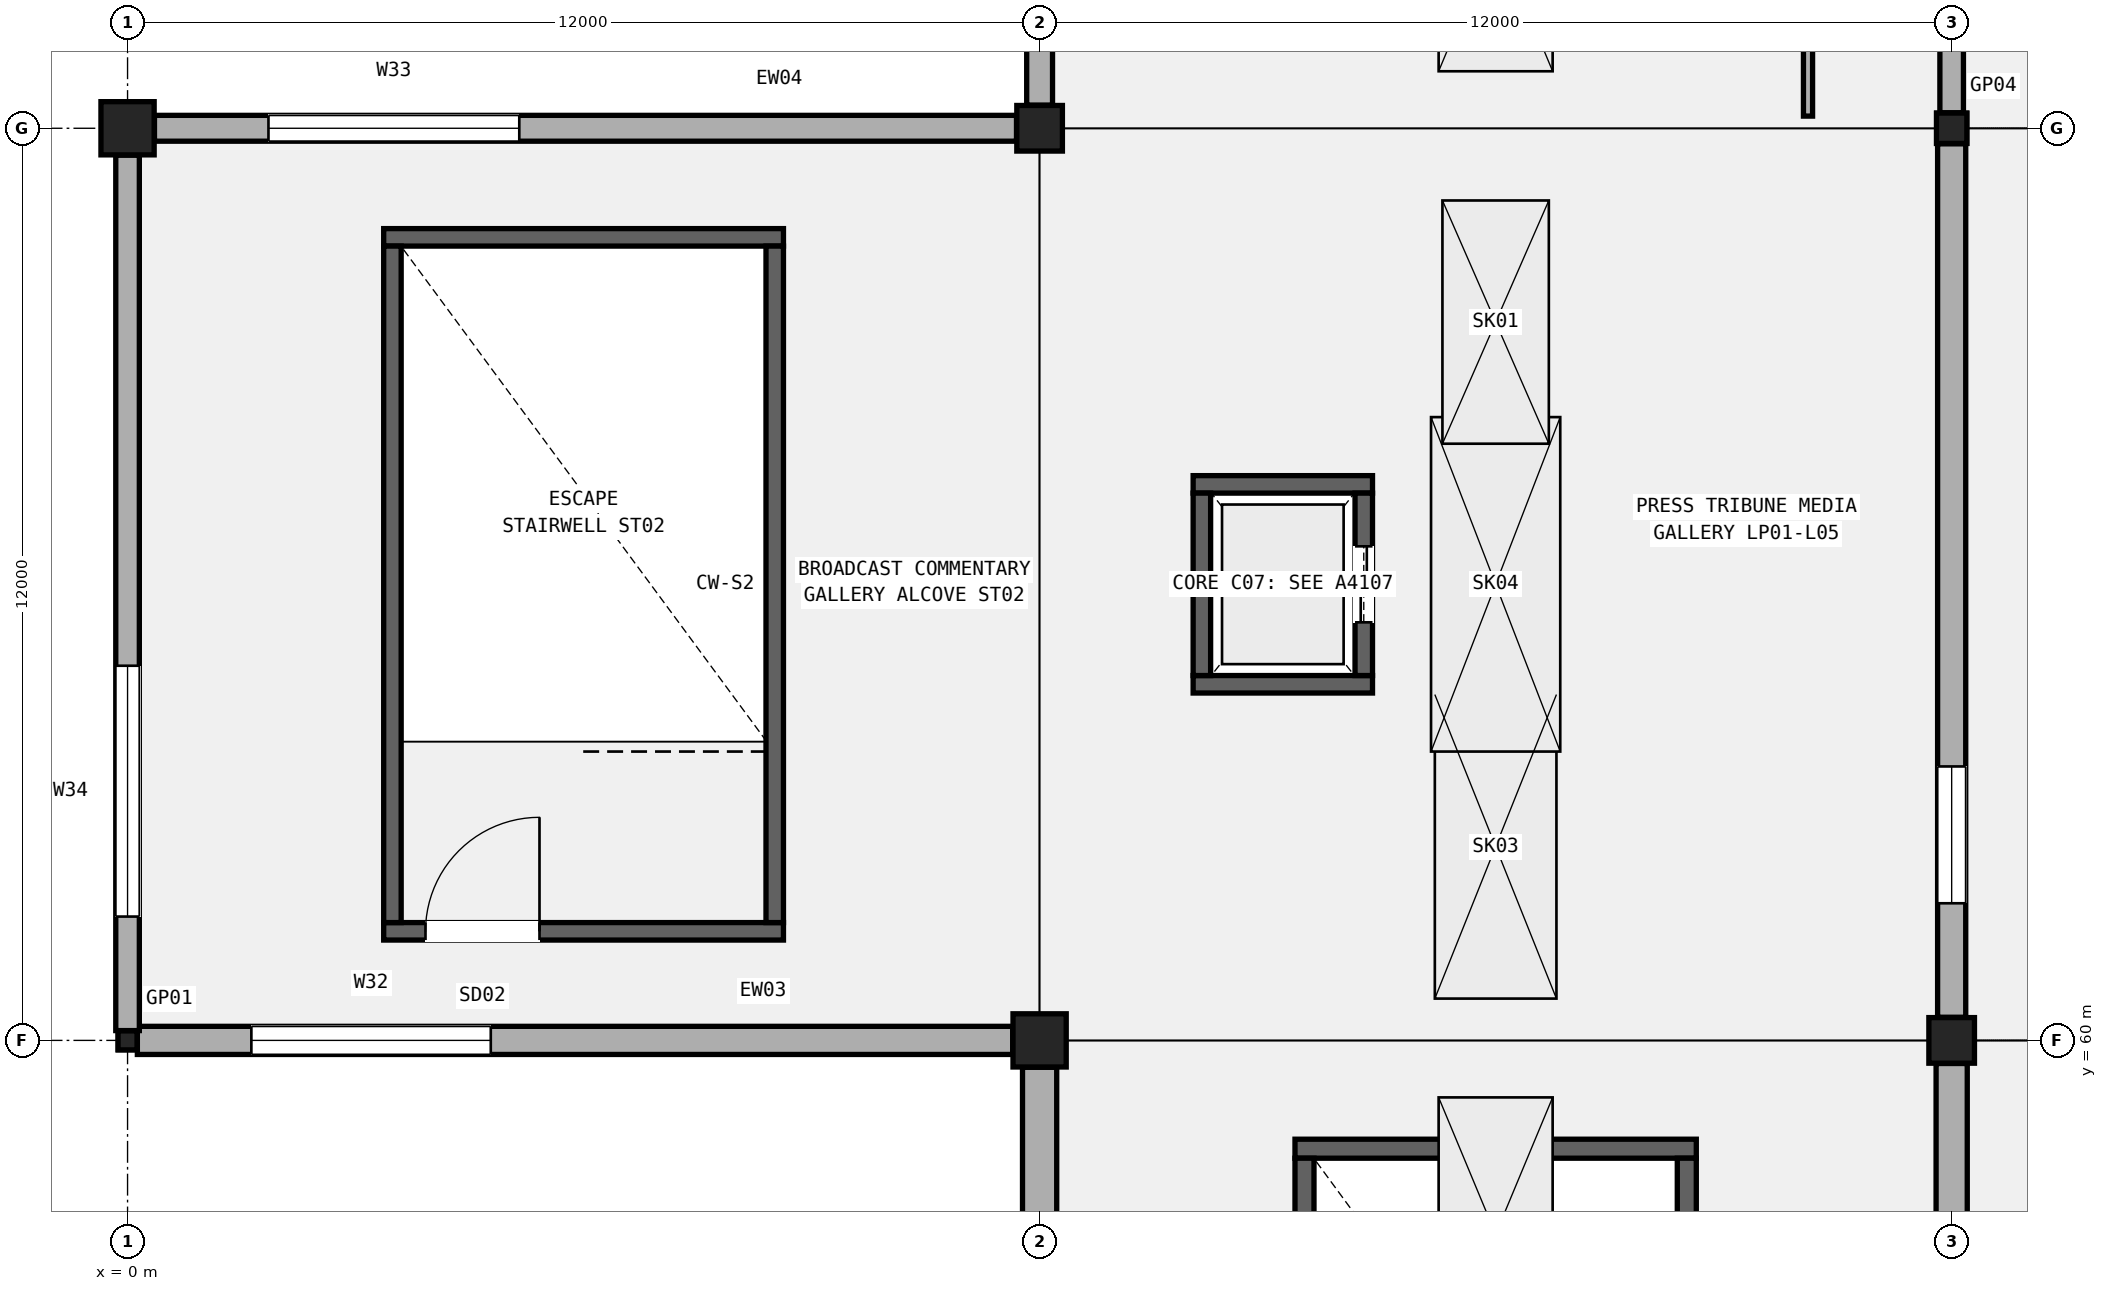
"""IFC4 building model, lengths in metres.
Left out: names, types, materials, properties, quantities, classifications, styles, units other than length and angle.
Written with IfcOpenShell. Run it as: python <this file> out.ifc"""

import sys

from ifc_helpers import new_model, si_unit, direction, frame, frame_2d, origin, origin_2d, place, context, subcontext, project, spatial, rectangle, hollow_rectangle, extrude, element, fill, save


model = new_model("IFC4")
c1 = context("Model", 3, precision=1e-05, world=origin(), true_north=direction((0.0, 1.0)))
c2 = subcontext(c1, "Body", "Model", "MODEL_VIEW")
j1 = project(units=[si_unit("LENGTHUNIT", "METRE"), si_unit("PLANEANGLEUNIT", "RADIAN")], contexts=[c1])
p1 = place(None, origin())
s1 = spatial("IfcSite", under=j1, at=p1, CompositionType="ELEMENT")
p2 = place(p1, origin())
s2 = spatial("IfcBuilding", under=s1, at=p2, CompositionType="ELEMENT")
p3 = place(p2, frame((0.0, 0.0, 25.8)))
s3 = spatial("IfcBuildingStorey", under=s2, at=p3, CompositionType="ELEMENT", Elevation=25.8)
p4 = place(p3, frame((0.0, 60.0, 0.0), z_axis=(0.0, 0.0, 1.0), x_axis=(1.0, 0.0, 0.0)))
e1 = element("IfcColumn", 1, at=p4, inside=s3, PredefinedType="COLUMN", context=c2, shape_type="SweptSolid", body=[
    extrude(hollow_rectangle(XDim=0.25, YDim=0.25, WallThickness=0.012, InnerFilletRadius=0.012, OuterFilletRadius=0.024, at=origin_2d()), origin(), (0.0, 0.0, 1.0), 5.4),
])
for number, where, z_axis, x_axis in (
    (2, (0.0, 72.0, 0.0), (0.0, 0.0, 1.0), (1.0, 0.0, 0.0)),
    (3, (12.0, 60.0, 0.0), (0.0, 0.0, 1.0), (1.0, 0.0, 0.0)),
):
    element("IfcColumn", number, at=place(p3, frame(where, z_axis=z_axis, x_axis=x_axis)), inside=s3, PredefinedType="COLUMN", context=c2, shape_type="SweptSolid", body=[
        extrude(rectangle(XDim=0.7, YDim=0.7, at=origin_2d()), origin(), (0.0, 0.0, 1.0), 5.4),
    ])
for number, where, z_axis, x_axis in (
    (4, (12.0, 72.0, 0.0), (0.0, 0.0, 1.0), (1.0, 0.0, 0.0)),
    (5, (24.0, 60.0, 0.0), (0.0, 0.0, 1.0), (1.0, 0.0, 0.0)),
):
    element("IfcColumn", number, at=place(p3, frame(where, z_axis=z_axis, x_axis=x_axis)), inside=s3, PredefinedType="COLUMN", context=c2, shape_type="SweptSolid", body=[
        extrude(rectangle(XDim=0.6, YDim=0.6, at=origin_2d()), origin(), (0.0, 0.0, 1.0), 5.4),
    ])
p5 = place(p3, frame((24.0, 72.0, 0.0), z_axis=(0.0, 0.0, 1.0), x_axis=(1.0, 0.0, 0.0)))
e6 = element("IfcColumn", 6, at=p5, inside=s3, PredefinedType="COLUMN", context=c2, shape_type="SweptSolid", body=[
    extrude(hollow_rectangle(XDim=0.4, YDim=0.4, WallThickness=0.016, InnerFilletRadius=0.016, OuterFilletRadius=0.032, at=origin_2d()), origin(), (0.0, 0.0, 1.0), 5.4),
])
p6 = place(p3, frame((0.129, 60.0, 0.0), z_axis=(0.0, 0.0, 1.0), x_axis=(1.0, 0.0, 0.0)))
e7 = element("IfcWall", 7, at=p6, inside=s3, PredefinedType="SOLIDWALL", context=c2, shape_type="SweptSolid", body=[
    extrude(rectangle(XDim=11.517, YDim=0.37, at=frame_2d((5.759, 0.0))), origin(), (0.0, 0.0, 1.0), 4.452),
])
p7 = place(p6, frame((1.5, 0.0, 0.95)))
e8 = element("IfcOpeningElement", 8, at=p7, cuts=e7, PredefinedType="OPENING", context=c2, shape_type="SweptSolid", body=[
    extrude(rectangle(XDim=3.15, YDim=1.9, at=frame_2d((1.575, 0.95))), frame((0.0, 0.195, 0.0), z_axis=(0.0, -1.0, 0.0), x_axis=(1.0, 0.0, 0.0)), (0.0, 0.0, 1.0), 0.39),
])
p8 = place(p3, frame((0.354, 72.0, 0.0), z_axis=(0.0, 0.0, 1.0), x_axis=(1.0, 0.0, 0.0)))
e9 = element("IfcWall", 9, at=p8, inside=s3, PredefinedType="SOLIDWALL", context=c2, shape_type="SweptSolid", body=[
    extrude(rectangle(XDim=11.342, YDim=0.34, at=frame_2d((5.671, 0.0))), origin(), (0.0, 0.0, 1.0), 4.34),
])
p9 = place(p8, frame((1.5, 0.0, 0.95)))
e10 = element("IfcOpeningElement", 10, at=p9, cuts=e9, PredefinedType="OPENING", context=c2, shape_type="SweptSolid", body=[
    extrude(rectangle(XDim=3.3, YDim=1.8, at=frame_2d((1.65, 0.9))), frame((0.0, 0.18, 0.0), z_axis=(0.0, -1.0, 0.0), x_axis=(1.0, 0.0, 0.0)), (0.0, 0.0, 1.0), 0.36),
])
p10 = place(p3, frame((0.0, 60.129, 0.0), z_axis=(0.0, 0.0, 1.0), x_axis=(0.0, 1.0, 0.0)))
e11 = element("IfcWall", 11, at=p10, inside=s3, PredefinedType="SOLIDWALL", context=c2, shape_type="SweptSolid", body=[
    extrude(rectangle(XDim=11.517, YDim=0.31, at=frame_2d((5.759, 0.0))), origin(), (0.0, 0.0, 1.0), 4.452),
])
p11 = place(p10, frame((1.5, 0.0, 0.95)))
e12 = element("IfcOpeningElement", 12, at=p11, cuts=e11, PredefinedType="OPENING", context=c2, shape_type="SweptSolid", body=[
    extrude(rectangle(XDim=3.3, YDim=2.25, at=frame_2d((1.65, 1.125))), frame((0.0, 0.165, 0.0), z_axis=(0.0, -1.0, 0.0), x_axis=(1.0, 0.0, 0.0)), (0.0, 0.0, 1.0), 0.33),
])
p12 = place(p3, frame((12.0, 48.129, 0.0), z_axis=(0.0, 0.0, 1.0), x_axis=(0.0, 1.0, 0.0)))
e13 = element("IfcWall", 13, at=p12, inside=s3, PredefinedType="SOLIDWALL", context=c2, shape_type="SweptSolid", body=[
    extrude(rectangle(XDim=11.517, YDim=0.45, at=frame_2d((5.759, 0.0))), origin(), (0.0, 0.0, 1.0), 4.452),
])
p13 = place(p12, frame((1.5, 0.0, 0.95)))
e14 = element("IfcOpeningElement", 14, at=p13, cuts=e13, PredefinedType="OPENING", context=c2, shape_type="SweptSolid", body=[
    extrude(rectangle(XDim=1.65, YDim=2.45, at=frame_2d((0.825, 1.225))), frame((0.0, 0.235, 0.0), z_axis=(0.0, -1.0, 0.0), x_axis=(1.0, 0.0, 0.0)), (0.0, 0.0, 1.0), 0.47),
])
p14 = place(p3, frame((24.0, 48.354, 0.0), z_axis=(0.0, 0.0, 1.0), x_axis=(0.0, 1.0, 0.0)))
e15 = element("IfcWall", 15, at=p14, inside=s3, PredefinedType="SOLIDWALL", context=c2, shape_type="SweptSolid", body=[
    extrude(rectangle(XDim=11.342, YDim=0.41, at=frame_2d((5.671, 0.0))), origin(), (0.0, 0.0, 1.0), 4.13),
])
p15 = place(p14, frame((1.5, 0.0, 0.95)))
e16 = element("IfcOpeningElement", 16, at=p15, cuts=e15, PredefinedType="OPENING", context=c2, shape_type="SweptSolid", body=[
    extrude(rectangle(XDim=1.8, YDim=1.75, at=frame_2d((0.9, 0.875))), frame((0.0, 0.215, 0.0), z_axis=(0.0, -1.0, 0.0), x_axis=(1.0, 0.0, 0.0)), (0.0, 0.0, 1.0), 0.43),
])
p16 = place(p3, frame((24.0, 60.304, 0.0), z_axis=(0.0, 0.0, 1.0), x_axis=(0.0, 1.0, 0.0)))
e17 = element("IfcWall", 17, at=p16, inside=s3, PredefinedType="SOLIDWALL", context=c2, shape_type="SweptSolid", body=[
    extrude(rectangle(XDim=11.492, YDim=0.37, at=frame_2d((5.746, 0.0))), origin(), (0.0, 0.0, 1.0), 4.13),
])
p17 = place(p16, frame((1.5, 0.0, 0.95)))
e18 = element("IfcOpeningElement", 18, at=p17, cuts=e17, PredefinedType="OPENING", context=c2, shape_type="SweptSolid", body=[
    extrude(rectangle(XDim=1.8, YDim=2.15, at=frame_2d((0.9, 1.075))), frame((0.0, 0.195, 0.0), z_axis=(0.0, -1.0, 0.0), x_axis=(1.0, 0.0, 0.0)), (0.0, 0.0, 1.0), 0.39),
])
p18 = place(p3, frame((12.0, 72.304, 0.0), z_axis=(0.0, 0.0, 1.0), x_axis=(0.0, 1.0, 0.0)))
e19 = element("IfcWall", 19, at=p18, inside=s3, PredefinedType="SOLIDWALL", context=c2, shape_type="SweptSolid", body=[
    extrude(rectangle(XDim=11.492, YDim=0.34, at=frame_2d((5.746, 0.0))), origin(), (0.0, 0.0, 1.0), 4.44),
])
p19 = place(p18, frame((5.859, 0.0, 0.95)))
e20 = element("IfcOpeningElement", 20, at=p19, cuts=e19, PredefinedType="OPENING", context=c2, shape_type="SweptSolid", body=[
    extrude(rectangle(XDim=1.8, YDim=2.55, at=frame_2d((0.9, 1.275))), frame((0.0, 0.18, 0.0), z_axis=(0.0, -1.0, 0.0), x_axis=(1.0, 0.0, 0.0)), (0.0, 0.0, 1.0), 0.36),
])
p20 = place(p3, frame((24.0, 72.204, 0.0), z_axis=(0.0, 0.0, 1.0), x_axis=(0.0, 1.0, 0.0)))
e21 = element("IfcWall", 21, at=p20, inside=s3, PredefinedType="SOLIDWALL", context=c2, shape_type="SweptSolid", body=[
    extrude(rectangle(XDim=11.617, YDim=0.31, at=frame_2d((5.809, 0.0))), origin(), (0.0, 0.0, 1.0), 4.13),
])
p21 = place(p20, frame((1.5, 0.0, 0.95)))
e22 = element("IfcOpeningElement", 22, at=p21, cuts=e21, PredefinedType="OPENING", context=c2, shape_type="SweptSolid", body=[
    extrude(rectangle(XDim=1.95, YDim=1.9, at=frame_2d((0.975, 0.95))), frame((0.0, 0.165, 0.0), z_axis=(0.0, -1.0, 0.0), x_axis=(1.0, 0.0, 0.0)), (0.0, 0.0, 1.0), 0.33),
])
p22 = place(p3, frame((3.37, 61.435, 0.0), z_axis=(0.0, 0.0, 1.0), x_axis=(1.0, 0.0, 0.0)))
e23 = element("IfcWall", 23, at=p22, inside=s3, PredefinedType="SHEAR", context=c2, shape_type="SweptSolid", body=[
    extrude(rectangle(XDim=5.26, YDim=0.23, at=frame_2d((2.63, 0.0))), origin(), (0.0, 0.0, 1.0), 5.04),
])
p23 = place(p22, frame((0.55, 0.0, 0.0)))
e24 = element("IfcOpeningElement", 24, at=p23, cuts=e23, PredefinedType="OPENING", context=c2, shape_type="SweptSolid", body=[
    extrude(rectangle(XDim=1.5, YDim=2.2, at=frame_2d((0.75, 1.1))), frame((0.0, 0.125, 0.0), z_axis=(0.0, -1.0, 0.0), x_axis=(1.0, 0.0, 0.0)), (0.0, 0.0, 1.0), 0.25),
])
p24 = place(p3, frame((3.37, 70.565, 0.0), z_axis=(0.0, 0.0, 1.0), x_axis=(1.0, 0.0, 0.0)))
e25 = element("IfcWall", 25, at=p24, inside=s3, PredefinedType="SHEAR", context=c2, shape_type="SweptSolid", body=[
    extrude(rectangle(XDim=5.26, YDim=0.23, at=frame_2d((2.63, 0.0))), origin(), (0.0, 0.0, 1.0), 5.04),
])
for number, where, z_axis, x_axis in (
    (26, (3.485, 61.55, 0.0), (0.0, 0.0, 1.0), (0.0, 1.0, 0.0)),
    (27, (8.515, 61.55, 0.0), (0.0, 0.0, 1.0), (0.0, 1.0, 0.0)),
):
    element("IfcWall", number, at=place(p3, frame(where, z_axis=z_axis, x_axis=x_axis)), inside=s3, PredefinedType="SHEAR", context=c2, shape_type="SweptSolid", body=[
        extrude(rectangle(XDim=8.9, YDim=0.23, at=frame_2d((4.45, 0.0))), origin(), (0.0, 0.0, 1.0), 5.04),
    ])
p25 = place(p3, frame((15.36, 58.575, 0.0), z_axis=(0.0, 0.0, 1.0), x_axis=(1.0, 0.0, 0.0)))
e28 = element("IfcWall", 28, at=p25, inside=s3, PredefinedType="SHEAR", context=c2, shape_type="SweptSolid", body=[
    extrude(rectangle(XDim=5.28, YDim=0.25, at=frame_2d((2.64, 0.0))), origin(), (0.0, 0.0, 1.0), 5.04),
])
for number, where, z_axis, x_axis in (
    (29, (15.485, 49.55, 0.0), (0.0, 0.0, 1.0), (0.0, 1.0, 0.0)),
    (30, (20.515, 49.55, 0.0), (0.0, 0.0, 1.0), (0.0, 1.0, 0.0)),
):
    element("IfcWall", number, at=place(p3, frame(where, z_axis=z_axis, x_axis=x_axis)), inside=s3, PredefinedType="SHEAR", context=c2, shape_type="SweptSolid", body=[
        extrude(rectangle(XDim=8.9, YDim=0.25, at=frame_2d((4.45, 0.0))), origin(), (0.0, 0.0, 1.0), 5.04),
    ])
for number, where, z_axis, x_axis in (
    (31, (14.02, 64.685, 0.0), (0.0, 0.0, 1.0), (1.0, 0.0, 0.0)),
    (32, (14.02, 67.315, 0.0), (0.0, 0.0, 1.0), (1.0, 0.0, 0.0)),
):
    element("IfcWall", number, at=place(p3, frame(where, z_axis=z_axis, x_axis=x_axis)), inside=s3, PredefinedType="SHEAR", context=c2, shape_type="SweptSolid", body=[
        extrude(rectangle(XDim=2.36, YDim=0.23, at=frame_2d((1.18, 0.0))), origin(), (0.0, 0.0, 1.0), 5.04),
    ])
p26 = place(p3, frame((14.135, 64.8, 0.0), z_axis=(0.0, 0.0, 1.0), x_axis=(0.0, 1.0, 0.0)))
e33 = element("IfcWall", 33, at=p26, inside=s3, PredefinedType="SHEAR", context=c2, shape_type="SweptSolid", body=[
    extrude(rectangle(XDim=2.4, YDim=0.23, at=frame_2d((1.2, 0.0))), origin(), (0.0, 0.0, 1.0), 5.04),
])
p27 = place(p3, frame((16.265, 64.8, 0.0), z_axis=(0.0, 0.0, 1.0), x_axis=(0.0, 1.0, 0.0)))
e34 = element("IfcWall", 34, at=p27, inside=s3, PredefinedType="SHEAR", context=c2, shape_type="SweptSolid", body=[
    extrude(rectangle(XDim=2.4, YDim=0.23, at=frame_2d((1.2, 0.0))), origin(), (0.0, 0.0, 1.0), 5.04),
])
p28 = place(p27, frame((0.7, 0.0, 0.0)))
e35 = element("IfcOpeningElement", 35, at=p28, cuts=e34, PredefinedType="OPENING", context=c2, shape_type="SweptSolid", body=[
    extrude(rectangle(XDim=1.0, YDim=2.15, at=frame_2d((0.5, 1.075))), frame((0.0, 0.125, 0.0), z_axis=(0.0, -1.0, 0.0), x_axis=(1.0, 0.0, 0.0)), (0.0, 0.0, 1.0), 0.25),
])
p29 = place(p3, frame((22.11, 72.16, 0.0), z_axis=(0.0, 0.0, 1.0), x_axis=(0.0, 1.0, 0.0)))
e36 = element("IfcWall", 36, at=p29, inside=s3, PredefinedType="PARTITIONING", context=c2, shape_type="SweptSolid", body=[
    extrude(rectangle(XDim=11.68, YDim=0.12, at=frame_2d((5.84, 0.0))), origin(), (0.0, 0.0, 1.0), 4.35),
])
p30 = place(p29, frame((2.116, 0.0, 0.0)))
e37 = element("IfcOpeningElement", 37, at=p30, cuts=e36, PredefinedType="OPENING", context=c2, shape_type="SweptSolid", body=[
    extrude(rectangle(XDim=1.06, YDim=2.15, at=frame_2d((0.53, 1.075))), frame((0.0, 0.07, 0.0), z_axis=(0.0, -1.0, 0.0), x_axis=(1.0, 0.0, 0.0)), (0.0, 0.0, 1.0), 0.14),
])
p31 = place(p29, frame((8.021, 0.0, 0.0)))
e38 = element("IfcOpeningElement", 38, at=p31, cuts=e36, PredefinedType="OPENING", context=c2, shape_type="SweptSolid", body=[
    extrude(rectangle(XDim=1.09, YDim=2.16, at=frame_2d((0.545, 1.08))), frame((0.0, 0.07, 0.0), z_axis=(0.0, -1.0, 0.0), x_axis=(1.0, 0.0, 0.0)), (0.0, 0.0, 1.0), 0.14),
])
p32 = place(p7, origin())
e39 = element("IfcWindow", 39, at=p32, inside=s3, PartitioningType="SINGLE_PANEL", PredefinedType="WINDOW", context=c2, shape_type="SweptSolid", body=[
    extrude(rectangle(XDim=3.15, YDim=1.9, at=frame_2d((1.575, 0.95))), frame((0.0, 0.03, 0.0), z_axis=(0.0, -1.0, 0.0), x_axis=(1.0, 0.0, 0.0)), (0.0, 0.0, 1.0), 0.06),
])
fill(e8, e39)
p33 = place(p9, origin())
e40 = element("IfcWindow", 40, at=p33, inside=s3, PartitioningType="SINGLE_PANEL", PredefinedType="WINDOW", context=c2, shape_type="SweptSolid", body=[
    extrude(rectangle(XDim=3.3, YDim=1.8, at=frame_2d((1.65, 0.9))), frame((0.0, 0.03, 0.0), z_axis=(0.0, -1.0, 0.0), x_axis=(1.0, 0.0, 0.0)), (0.0, 0.0, 1.0), 0.06),
])
fill(e10, e40)
p34 = place(p11, origin())
e41 = element("IfcWindow", 41, at=p34, inside=s3, PartitioningType="SINGLE_PANEL", PredefinedType="WINDOW", context=c2, shape_type="SweptSolid", body=[
    extrude(rectangle(XDim=3.3, YDim=2.25, at=frame_2d((1.65, 1.125))), frame((0.0, 0.03, 0.0), z_axis=(0.0, -1.0, 0.0), x_axis=(1.0, 0.0, 0.0)), (0.0, 0.0, 1.0), 0.06),
])
fill(e12, e41)
p35 = place(p17, origin())
e42 = element("IfcWindow", 42, at=p35, inside=s3, PartitioningType="SINGLE_PANEL", PredefinedType="WINDOW", context=c2, shape_type="SweptSolid", body=[
    extrude(rectangle(XDim=1.8, YDim=2.15, at=frame_2d((0.9, 1.075))), frame((0.0, 0.03, 0.0), z_axis=(0.0, -1.0, 0.0), x_axis=(1.0, 0.0, 0.0)), (0.0, 0.0, 1.0), 0.06),
])
fill(e18, e42)
p36 = place(p2, frame((0.0, 0.0, 31.2)))
p37 = place(p36, frame((0.0, 0.0, -0.36)))
p38 = place(p37, frame((18.0, 57.45, 0.0)))
p39 = place(p38, frame((0.0, 0.0, 0.31)))
e43 = element("IfcWindow", 43, at=p39, inside=s3, PartitioningType="SINGLE_PANEL", PredefinedType="SKYLIGHT", context=c2, shape_type="SweptSolid", body=[
    extrude(rectangle(XDim=3.6, YDim=1.5, at=origin_2d()), origin(), (0.0, 0.0, 1.0), 0.05),
])
p40 = place(p36, frame((0.0, 0.0, -0.36)))
p41 = place(p40, frame((18.0, 62.55, 0.0)))
p42 = place(p41, frame((0.0, 0.0, 0.31)))
e44 = element("IfcWindow", 44, at=p42, inside=s3, PartitioningType="SINGLE_PANEL", PredefinedType="SKYLIGHT", context=c2, shape_type="SweptSolid", body=[
    extrude(rectangle(XDim=4.0, YDim=1.6, at=origin_2d()), origin(), (0.0, 0.0, 1.0), 0.05),
])
p43 = place(p40, frame((18.0, 66.0, 0.0)))
p44 = place(p43, frame((0.0, 0.0, 0.31)))
e45 = element("IfcWindow", 45, at=p44, inside=s3, PartitioningType="SINGLE_PANEL", PredefinedType="SKYLIGHT", context=c2, shape_type="SweptSolid", body=[
    extrude(rectangle(XDim=4.4, YDim=1.7, at=origin_2d()), origin(), (0.0, 0.0, 1.0), 0.05),
])
p45 = place(p40, frame((18.0, 69.45, 0.0)))
p46 = place(p45, frame((0.0, 0.0, 0.31)))
e46 = element("IfcWindow", 46, at=p46, inside=s3, PartitioningType="SINGLE_PANEL", PredefinedType="SKYLIGHT", context=c2, shape_type="SweptSolid", body=[
    extrude(rectangle(XDim=3.2, YDim=1.4, at=origin_2d()), origin(), (0.0, 0.0, 1.0), 0.05),
])
p47 = place(p23, origin())
e47 = element("IfcDoor", 47, at=p47, inside=s3, OperationType="SINGLE_SWING_RIGHT", PredefinedType="DOOR", context=c2, shape_type="SweptSolid", body=[
    extrude(rectangle(XDim=1.5, YDim=2.2, at=frame_2d((0.75, 1.1))), frame((0.0, 0.025, 0.0), z_axis=(0.0, -1.0, 0.0), x_axis=(1.0, 0.0, 0.0)), (0.0, 0.0, 1.0), 0.05),
])
fill(e24, e47)
p48 = place(p28, origin())
e48 = element("IfcDoor", 48, at=p48, inside=s3, OperationType="DOUBLE_DOOR_SLIDING", PredefinedType="DOOR", context=c2, shape_type="SweptSolid", body=[
    extrude(rectangle(XDim=1.0, YDim=2.15, at=frame_2d((0.5, 1.075))), frame((0.0, 0.025, 0.0), z_axis=(0.0, -1.0, 0.0), x_axis=(1.0, 0.0, 0.0)), (0.0, 0.0, 1.0), 0.05),
])
fill(e35, e48)
save(model, sys.argv[1])
